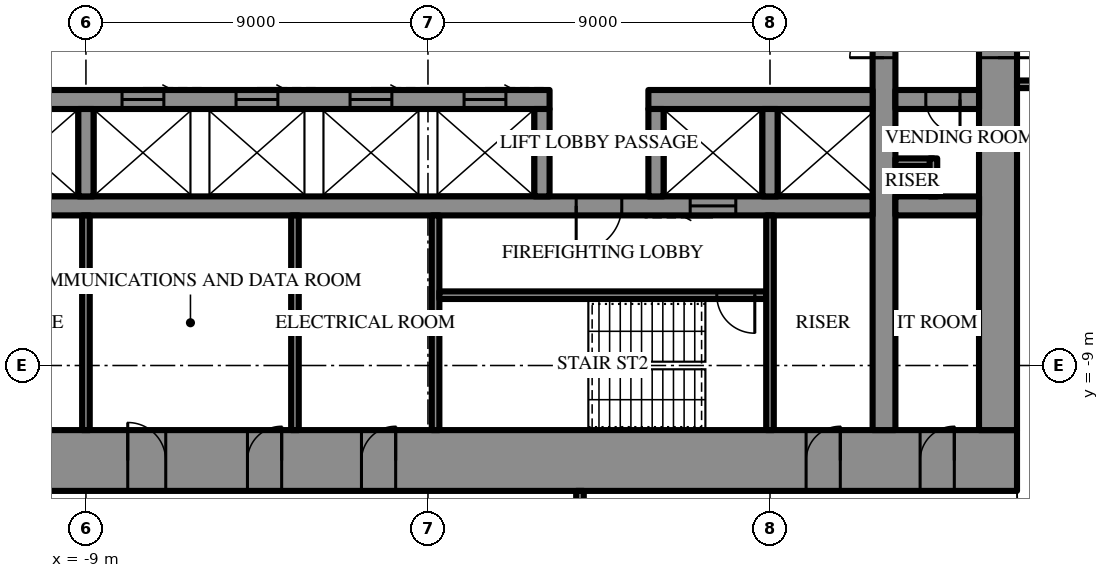
"""IFC4 building model, lengths in metres.
Left out: names, types, materials, properties, quantities, classifications, styles, units other than length and angle.
Written with IfcOpenShell. Run it as: python <this file> out.ifc"""

import sys

from ifc_helpers import new_model, si_unit, direction, frame, frame_2d, origin, place, context, subcontext, project, spatial, rectangle, extrude, element, fill, save


model = new_model("IFC4")
c1 = context("Model", 3, precision=1e-05, world=origin(), true_north=direction((0.0, 1.0)))
c2 = subcontext(c1, "Body", "Model", "MODEL_VIEW")
j1 = project(units=[si_unit("LENGTHUNIT", "METRE"), si_unit("PLANEANGLEUNIT", "RADIAN")], contexts=[c1])
p1 = place(None, origin())
s1 = spatial("IfcSite", under=j1, at=p1, CompositionType="ELEMENT")
p2 = place(p1, origin())
s2 = spatial("IfcBuilding", under=s1, at=p2, CompositionType="ELEMENT")
p3 = place(p2, frame((0.0, 0.0, 228.1)))
s3 = spatial("IfcBuildingStorey", under=s2, at=p3, CompositionType="ELEMENT", Elevation=228.1)
p4 = place(p3, frame((15.5, -11.5, 0.0), z_axis=(0.0, 0.0, 1.0), x_axis=(-1.0, 0.0, 0.0)))
e1 = element("IfcWall", 1, at=p4, inside=s3, PredefinedType="SHEAR", context=c2, shape_type="SweptSolid", body=[
    extrude(rectangle(XDim=31.0, YDim=1.6, at=frame_2d((15.5, 0.0))), origin(), (0.0, 0.0, 1.0), 4.2),
])
p5 = place(p4, frame((16.35, 0.0, 0.0)))
e2 = element("IfcOpeningElement", 2, at=p5, cuts=e1, PredefinedType="OPENING", context=c2, shape_type="SweptSolid", body=[
    extrude(rectangle(XDim=0.9, YDim=2.2, at=frame_2d((0.45, 1.1))), frame((0.0, 0.81, 0.0), z_axis=(0.0, -1.0, 0.0), x_axis=(1.0, 0.0, 0.0)), (0.0, 0.0, 1.0), 1.62),
])
p6 = place(p4, frame((19.35, 0.0, 0.0)))
e3 = element("IfcOpeningElement", 3, at=p6, cuts=e1, PredefinedType="OPENING", context=c2, shape_type="SweptSolid", body=[
    extrude(rectangle(XDim=0.9, YDim=2.2, at=frame_2d((0.45, 1.1))), frame((0.0, 0.81, 0.0), z_axis=(0.0, -1.0, 0.0), x_axis=(1.0, 0.0, 0.0)), (0.0, 0.0, 1.0), 1.62),
])
p7 = place(p4, frame((22.4, 0.0, 0.0)))
e4 = element("IfcOpeningElement", 4, at=p7, cuts=e1, PredefinedType="OPENING", context=c2, shape_type="SweptSolid", body=[
    extrude(rectangle(XDim=1.0, YDim=2.2, at=frame_2d((0.5, 1.1))), frame((0.0, 0.81, 0.0), z_axis=(0.0, -1.0, 0.0), x_axis=(1.0, 0.0, 0.0)), (0.0, 0.0, 1.0), 1.62),
])
p8 = place(p4, frame((1.65, 0.0, 0.0)))
e5 = element("IfcOpeningElement", 5, at=p8, cuts=e1, PredefinedType="OPENING", context=c2, shape_type="SweptSolid", body=[
    extrude(rectangle(XDim=0.9, YDim=2.2, at=frame_2d((0.45, 1.1))), frame((0.0, 0.81, 0.0), z_axis=(0.0, -1.0, 0.0), x_axis=(1.0, 0.0, 0.0)), (0.0, 0.0, 1.0), 1.62),
])
p9 = place(p4, frame((4.65, 0.0, 0.0)))
e6 = element("IfcOpeningElement", 6, at=p9, cuts=e1, PredefinedType="OPENING", context=c2, shape_type="SweptSolid", body=[
    extrude(rectangle(XDim=0.9, YDim=2.2, at=frame_2d((0.45, 1.1))), frame((0.0, 0.81, 0.0), z_axis=(0.0, -1.0, 0.0), x_axis=(1.0, 0.0, 0.0)), (0.0, 0.0, 1.0), 1.62),
])
p10 = place(p4, frame((25.45, 0.0, 0.0)))
e7 = element("IfcOpeningElement", 7, at=p10, cuts=e1, PredefinedType="OPENING", context=c2, shape_type="SweptSolid", body=[
    extrude(rectangle(XDim=0.9, YDim=2.2, at=frame_2d((0.45, 1.1))), frame((0.0, 0.81, 0.0), z_axis=(0.0, -1.0, 0.0), x_axis=(1.0, 0.0, 0.0)), (0.0, 0.0, 1.0), 1.62),
])
p11 = place(p4, frame((28.45, 0.0, 0.0)))
e8 = element("IfcOpeningElement", 8, at=p11, cuts=e1, PredefinedType="OPENING", context=c2, shape_type="SweptSolid", body=[
    extrude(rectangle(XDim=0.9, YDim=2.2, at=frame_2d((0.45, 1.1))), frame((0.0, 0.81, 0.0), z_axis=(0.0, -1.0, 0.0), x_axis=(1.0, 0.0, 0.0)), (0.0, 0.0, 1.0), 1.62),
])
p12 = place(p3, frame((15.0, -10.7, 0.0), z_axis=(0.0, 0.0, 1.0), x_axis=(0.0, 1.0, 0.0)))
e9 = element("IfcWall", 9, at=p12, inside=s3, PredefinedType="SHEAR", context=c2, shape_type="SweptSolid", body=[
    extrude(rectangle(XDim=21.4, YDim=1.0, at=frame_2d((10.7, 0.0))), origin(), (0.0, 0.0, 1.0), 4.2),
])
p13 = place(p12, frame((9.8, 0.0, 0.0)))
e10 = element("IfcOpeningElement", 10, at=p13, cuts=e9, PredefinedType="OPENING", context=c2, shape_type="SweptSolid", body=[
    extrude(rectangle(XDim=1.8, YDim=2.4, at=frame_2d((0.9, 1.2))), frame((0.0, 0.51, 0.0), z_axis=(0.0, -1.0, 0.0), x_axis=(1.0, 0.0, 0.0)), (0.0, 0.0, 1.0), 1.02),
])
p14 = place(p3, frame((12.0, -10.7, 0.0), z_axis=(0.0, 0.0, 1.0), x_axis=(0.0, 1.0, 0.0)))
e11 = element("IfcWall", 11, at=p14, inside=s3, PredefinedType="SHEAR", context=c2, shape_type="SweptSolid", body=[
    extrude(rectangle(XDim=21.4, YDim=0.6, at=frame_2d((10.7, 0.0))), origin(), (0.0, 0.0, 1.0), 4.2),
])
p15 = place(p14, frame((9.8, 0.0, 0.0)))
e12 = element("IfcOpeningElement", 12, at=p15, cuts=e11, PredefinedType="OPENING", context=c2, shape_type="SweptSolid", body=[
    extrude(rectangle(XDim=1.8, YDim=2.4, at=frame_2d((0.9, 1.2))), frame((0.0, 0.31, 0.0), z_axis=(0.0, -1.0, 0.0), x_axis=(1.0, 0.0, 0.0)), (0.0, 0.0, 1.0), 0.62),
])
p16 = place(p3, frame((14.5, -2.0, 0.0), z_axis=(0.0, 0.0, 1.0), x_axis=(-1.0, 0.0, 0.0)))
e13 = element("IfcWall", 13, at=p16, inside=s3, PredefinedType="SHEAR", context=c2, shape_type="SweptSolid", body=[
    extrude(rectangle(XDim=2.2, YDim=0.5, at=frame_2d((1.1, 0.0))), origin(), (0.0, 0.0, 1.0), 4.2),
])
p17 = place(p16, frame((0.5, 0.0, 0.0)))
e14 = element("IfcOpeningElement", 14, at=p17, cuts=e13, PredefinedType="OPENING", context=c2, shape_type="SweptSolid", body=[
    extrude(rectangle(XDim=0.9, YDim=2.2, at=frame_2d((0.45, 1.1))), frame((0.0, 0.26, 0.0), z_axis=(0.0, -1.0, 0.0), x_axis=(1.0, 0.0, 0.0)), (0.0, 0.0, 1.0), 0.52),
])
p18 = place(p3, frame((11.7, -2.0, 0.0), z_axis=(0.0, 0.0, 1.0), x_axis=(-1.0, 0.0, 0.0)))
e15 = element("IfcWall", 15, at=p18, inside=s3, PredefinedType="SHEAR", context=c2, shape_type="SweptSolid", body=[
    extrude(rectangle(XDim=5.9, YDim=0.5, at=frame_2d((2.95, 0.0))), origin(), (0.0, 0.0, 1.0), 4.2),
])
p19 = place(p3, frame((3.2, -2.0, 0.0), z_axis=(0.0, 0.0, 1.0), x_axis=(-1.0, 0.0, 0.0)))
e16 = element("IfcWall", 16, at=p19, inside=s3, PredefinedType="SHEAR", context=c2, shape_type="SweptSolid", body=[
    extrude(rectangle(XDim=14.9, YDim=0.5, at=frame_2d((7.45, 0.0))), origin(), (0.0, 0.0, 1.0), 4.2),
])
p20 = place(p19, frame((1.15, 0.0, 0.0)))
e17 = element("IfcOpeningElement", 17, at=p20, cuts=e16, PredefinedType="OPENING", context=c2, shape_type="SweptSolid", body=[
    extrude(rectangle(XDim=1.1, YDim=2.2, at=frame_2d((0.55, 1.1))), frame((0.0, 0.26, 0.0), z_axis=(0.0, -1.0, 0.0), x_axis=(1.0, 0.0, 0.0)), (0.0, 0.0, 1.0), 0.52),
])
p21 = place(p19, frame((4.15, 0.0, 0.0)))
e18 = element("IfcOpeningElement", 18, at=p21, cuts=e16, PredefinedType="OPENING", context=c2, shape_type="SweptSolid", body=[
    extrude(rectangle(XDim=1.1, YDim=2.2, at=frame_2d((0.55, 1.1))), frame((0.0, 0.26, 0.0), z_axis=(0.0, -1.0, 0.0), x_axis=(1.0, 0.0, 0.0)), (0.0, 0.0, 1.0), 0.52),
])
p22 = place(p19, frame((7.15, 0.0, 0.0)))
e19 = element("IfcOpeningElement", 19, at=p22, cuts=e16, PredefinedType="OPENING", context=c2, shape_type="SweptSolid", body=[
    extrude(rectangle(XDim=1.1, YDim=2.2, at=frame_2d((0.55, 1.1))), frame((0.0, 0.26, 0.0), z_axis=(0.0, -1.0, 0.0), x_axis=(1.0, 0.0, 0.0)), (0.0, 0.0, 1.0), 0.52),
])
p23 = place(p19, frame((10.15, 0.0, 0.0)))
e20 = element("IfcOpeningElement", 20, at=p23, cuts=e16, PredefinedType="OPENING", context=c2, shape_type="SweptSolid", body=[
    extrude(rectangle(XDim=1.1, YDim=2.2, at=frame_2d((0.55, 1.1))), frame((0.0, 0.26, 0.0), z_axis=(0.0, -1.0, 0.0), x_axis=(1.0, 0.0, 0.0)), (0.0, 0.0, 1.0), 0.52),
])
p24 = place(p3, frame((14.5, -4.8, 0.0), z_axis=(0.0, 0.0, 1.0), x_axis=(-1.0, 0.0, 0.0)))
e21 = element("IfcWall", 21, at=p24, inside=s3, PredefinedType="SHEAR", context=c2, shape_type="SweptSolid", body=[
    extrude(rectangle(XDim=2.2, YDim=0.5, at=frame_2d((1.1, 0.0))), origin(), (0.0, 0.0, 1.0), 4.2),
])
p25 = place(p3, frame((11.7, -4.8, 0.0), z_axis=(0.0, 0.0, 1.0), x_axis=(-1.0, 0.0, 0.0)))
e22 = element("IfcWall", 22, at=p25, inside=s3, PredefinedType="SHEAR", context=c2, shape_type="SweptSolid", body=[
    extrude(rectangle(XDim=23.4, YDim=0.5, at=frame_2d((11.7, 0.0))), origin(), (0.0, 0.0, 1.0), 4.2),
])
p26 = place(p25, frame((6.6, 0.0, 0.0)))
e23 = element("IfcOpeningElement", 23, at=p26, cuts=e22, PredefinedType="OPENING", context=c2, shape_type="SweptSolid", body=[
    extrude(rectangle(XDim=1.2, YDim=2.2, at=frame_2d((0.6, 1.1))), frame((0.0, 0.26, 0.0), z_axis=(0.0, -1.0, 0.0), x_axis=(1.0, 0.0, 0.0)), (0.0, 0.0, 1.0), 0.52),
])
p27 = place(p25, frame((3.6, 0.0, 0.0)))
e24 = element("IfcOpeningElement", 24, at=p27, cuts=e22, PredefinedType="OPENING", context=c2, shape_type="SweptSolid", body=[
    extrude(rectangle(XDim=1.2, YDim=2.2, at=frame_2d((0.6, 1.1))), frame((0.0, 0.26, 0.0), z_axis=(0.0, -1.0, 0.0), x_axis=(1.0, 0.0, 0.0)), (0.0, 0.0, 1.0), 0.52),
])
for number, where, z_axis, x_axis in (
    (25, (9.0, -2.25, 0.0), (0.0, 0.0, 1.0), (0.0, -1.0, 0.0)),
    (26, (6.0, -2.25, 0.0), (0.0, 0.0, 1.0), (0.0, -1.0, 0.0)),
    (27, (3.0, -2.25, 0.0), (0.0, 0.0, 1.0), (0.0, -1.0, 0.0)),
    (28, (-9.0, -2.25, 0.0), (0.0, 0.0, 1.0), (0.0, -1.0, 0.0)),
):
    element("IfcWall", number, at=place(p3, frame(where, z_axis=z_axis, x_axis=x_axis)), inside=s3, PredefinedType="SHEAR", context=c2, shape_type="SweptSolid", body=[
        extrude(rectangle(XDim=2.3, YDim=0.4, at=frame_2d((1.15, 0.0))), origin(), (0.0, 0.0, 1.0), 4.2),
    ])
p28 = place(p3, frame((0.2, -5.05, 0.0), z_axis=(0.0, 0.0, 1.0), x_axis=(0.0, -1.0, 0.0)))
e29 = element("IfcWall", 29, at=p28, inside=s3, PredefinedType="SHEAR", context=c2, shape_type="SweptSolid", body=[
    extrude(rectangle(XDim=5.65, YDim=0.2, at=frame_2d((2.825, 0.0))), origin(), (0.0, 0.0, 1.0), 4.2),
])
p29 = place(p3, frame((8.9, -7.15, 0.0), z_axis=(0.0, 0.0, 1.0), x_axis=(-1.0, 0.0, 0.0)))
e30 = element("IfcWall", 30, at=p29, inside=s3, PredefinedType="SHEAR", context=c2, shape_type="SweptSolid", body=[
    extrude(rectangle(XDim=8.6, YDim=0.2, at=frame_2d((4.3, 0.0))), origin(), (0.0, 0.0, 1.0), 4.2),
])
p30 = place(p29, frame((0.3, 0.0, 0.0)))
e31 = element("IfcOpeningElement", 31, at=p30, cuts=e30, PredefinedType="OPENING", context=c2, shape_type="SweptSolid", body=[
    extrude(rectangle(XDim=1.0, YDim=2.2, at=frame_2d((0.5, 1.1))), frame((0.0, 0.11, 0.0), z_axis=(0.0, -1.0, 0.0), x_axis=(1.0, 0.0, 0.0)), (0.0, 0.0, 1.0), 0.22),
])
for number, where, z_axis, x_axis in (
    (32, (9.0, -5.05, 0.0), (0.0, 0.0, 1.0), (0.0, -1.0, 0.0)),
    (33, (-9.0, -5.05, 0.0), (0.0, 0.0, 1.0), (0.0, -1.0, 0.0)),
    (34, (-3.5, -5.05, 0.0), (0.0, 0.0, 1.0), (0.0, -1.0, 0.0)),
):
    element("IfcWall", number, at=place(p3, frame(where, z_axis=z_axis, x_axis=x_axis)), inside=s3, PredefinedType="PARTITIONING", context=c2, shape_type="SweptSolid", body=[
        extrude(rectangle(XDim=5.65, YDim=0.2, at=frame_2d((2.825, 0.0))), origin(), (0.0, 0.0, 1.0), 4.0),
    ])
for number, where, z_axis, x_axis in (
    (35, (13.3, -3.65, 0.0), (0.0, 0.0, 1.0), (-1.0, 0.0, 0.0)),
    (36, (13.3, -3.55, 0.0), (0.0, 0.0, 1.0), (0.0, -1.0, 0.0)),
):
    element("IfcWall", number, at=place(p3, frame(where, z_axis=z_axis, x_axis=x_axis)), inside=s3, PredefinedType="PARTITIONING", context=c2, shape_type="SweptSolid", body=[
        extrude(rectangle(XDim=1.0, YDim=0.2, at=frame_2d((0.5, 0.0))), origin(), (0.0, 0.0, 1.0), 4.0),
    ])
p31 = place(p3, frame((15.5, -1.6, 0.0), z_axis=(0.0, 0.0, 1.0), x_axis=(1.0, 0.0, 0.0)))
e37 = element("IfcWall", 37, at=p31, inside=s3, PredefinedType="PARTITIONING", context=c2, shape_type="SweptSolid", body=[
    extrude(rectangle(XDim=2.3, YDim=0.2, at=frame_2d((1.15, 0.0))), origin(), (0.0, 0.0, 1.0), 4.0),
])
p32 = place(p3, frame((4.0, -12.3, 0.0), z_axis=(0.0, 0.0, 1.0), x_axis=(0.0, -1.0, 0.0)))
e38 = element("IfcWall", 38, at=p32, inside=s3, PredefinedType="PARTITIONING", context=c2, shape_type="SweptSolid", body=[
    extrude(rectangle(XDim=15.35, YDim=0.2, at=frame_2d((7.675, 0.0))), origin(), (0.0, 0.0, 1.0), 4.0),
])
p33 = place(p13, frame((1.8, 0.0, 0.0), z_axis=(0.0, 0.0, 1.0), x_axis=(-1.0, 0.0, 0.0)))
e39 = element("IfcDoor", 39, at=p33, inside=s3, OperationType="DOUBLE_DOOR_SINGLE_SWING", PredefinedType="DOOR", context=c2, shape_type="SweptSolid", body=[
    extrude(rectangle(XDim=1.8, YDim=2.4, at=frame_2d((0.9, 1.2))), frame((0.0, 0.025, 0.0), z_axis=(0.0, -1.0, 0.0), x_axis=(1.0, 0.0, 0.0)), (0.0, 0.0, 1.0), 0.05),
])
fill(e10, e39)
p34 = place(p26, origin())
e40 = element("IfcDoor", 40, at=p34, inside=s3, OperationType="SINGLE_SWING_LEFT", PredefinedType="DOOR", context=c2, shape_type="SweptSolid", body=[
    extrude(rectangle(XDim=1.2, YDim=2.2, at=frame_2d((0.6, 1.1))), frame((0.0, 0.025, 0.0), z_axis=(0.0, -1.0, 0.0), x_axis=(1.0, 0.0, 0.0)), (0.0, 0.0, 1.0), 0.05),
])
fill(e23, e40)
p35 = place(p30, origin())
e41 = element("IfcDoor", 41, at=p35, inside=s3, OperationType="SINGLE_SWING_RIGHT", PredefinedType="DOOR", context=c2, shape_type="SweptSolid", body=[
    extrude(rectangle(XDim=1.0, YDim=2.2, at=frame_2d((0.5, 1.1))), frame((0.0, 0.025, 0.0), z_axis=(0.0, -1.0, 0.0), x_axis=(1.0, 0.0, 0.0)), (0.0, 0.0, 1.0), 0.05),
])
fill(e31, e41)
p36 = place(p5, frame((0.9, 0.0, 0.0), z_axis=(0.0, 0.0, 1.0), x_axis=(-1.0, 0.0, 0.0)))
e42 = element("IfcDoor", 42, at=p36, inside=s3, OperationType="SINGLE_SWING_LEFT", PredefinedType="DOOR", context=c2, shape_type="SweptSolid", body=[
    extrude(rectangle(XDim=0.9, YDim=2.2, at=frame_2d((0.45, 1.1))), frame((0.0, 0.025, 0.0), z_axis=(0.0, -1.0, 0.0), x_axis=(1.0, 0.0, 0.0)), (0.0, 0.0, 1.0), 0.05),
])
fill(e2, e42)
p37 = place(p6, frame((0.9, 0.0, 0.0), z_axis=(0.0, 0.0, 1.0), x_axis=(-1.0, 0.0, 0.0)))
e43 = element("IfcDoor", 43, at=p37, inside=s3, OperationType="SINGLE_SWING_LEFT", PredefinedType="DOOR", context=c2, shape_type="SweptSolid", body=[
    extrude(rectangle(XDim=0.9, YDim=2.2, at=frame_2d((0.45, 1.1))), frame((0.0, 0.025, 0.0), z_axis=(0.0, -1.0, 0.0), x_axis=(1.0, 0.0, 0.0)), (0.0, 0.0, 1.0), 0.05),
])
fill(e3, e43)
p38 = place(p7, frame((1.0, 0.0, 0.0), z_axis=(0.0, 0.0, 1.0), x_axis=(-1.0, 0.0, 0.0)))
e44 = element("IfcDoor", 44, at=p38, inside=s3, OperationType="SINGLE_SWING_RIGHT", PredefinedType="DOOR", context=c2, shape_type="SweptSolid", body=[
    extrude(rectangle(XDim=1.0, YDim=2.2, at=frame_2d((0.5, 1.1))), frame((0.0, 0.025, 0.0), z_axis=(0.0, -1.0, 0.0), x_axis=(1.0, 0.0, 0.0)), (0.0, 0.0, 1.0), 0.05),
])
fill(e4, e44)
p39 = place(p8, frame((0.9, 0.0, 0.0), z_axis=(0.0, 0.0, 1.0), x_axis=(-1.0, 0.0, 0.0)))
e45 = element("IfcDoor", 45, at=p39, inside=s3, OperationType="SINGLE_SWING_LEFT", PredefinedType="DOOR", context=c2, shape_type="SweptSolid", body=[
    extrude(rectangle(XDim=0.9, YDim=2.2, at=frame_2d((0.45, 1.1))), frame((0.0, 0.025, 0.0), z_axis=(0.0, -1.0, 0.0), x_axis=(1.0, 0.0, 0.0)), (0.0, 0.0, 1.0), 0.05),
])
fill(e5, e45)
p40 = place(p9, frame((0.9, 0.0, 0.0), z_axis=(0.0, 0.0, 1.0), x_axis=(-1.0, 0.0, 0.0)))
e46 = element("IfcDoor", 46, at=p40, inside=s3, OperationType="SINGLE_SWING_LEFT", PredefinedType="DOOR", context=c2, shape_type="SweptSolid", body=[
    extrude(rectangle(XDim=0.9, YDim=2.2, at=frame_2d((0.45, 1.1))), frame((0.0, 0.025, 0.0), z_axis=(0.0, -1.0, 0.0), x_axis=(1.0, 0.0, 0.0)), (0.0, 0.0, 1.0), 0.05),
])
fill(e6, e46)
p41 = place(p17, origin())
e47 = element("IfcDoor", 47, at=p41, inside=s3, OperationType="SINGLE_SWING_RIGHT", PredefinedType="DOOR", context=c2, shape_type="SweptSolid", body=[
    extrude(rectangle(XDim=0.9, YDim=2.2, at=frame_2d((0.45, 1.1))), frame((0.0, 0.025, 0.0), z_axis=(0.0, -1.0, 0.0), x_axis=(1.0, 0.0, 0.0)), (0.0, 0.0, 1.0), 0.05),
])
fill(e14, e47)
p42 = place(p15, origin())
e48 = element("IfcDoor", 48, at=p42, inside=s3, OperationType="DOUBLE_DOOR_SINGLE_SWING", PredefinedType="DOOR", context=c2, shape_type="SweptSolid", body=[
    extrude(rectangle(XDim=1.8, YDim=2.4, at=frame_2d((0.9, 1.2))), frame((0.0, 0.025, 0.0), z_axis=(0.0, -1.0, 0.0), x_axis=(1.0, 0.0, 0.0)), (0.0, 0.0, 1.0), 0.05),
])
fill(e12, e48)
p43 = place(p27, origin())
e49 = element("IfcDoor", 49, at=p43, inside=s3, OperationType="SLIDING_TO_LEFT", PredefinedType="DOOR", context=c2, shape_type="SweptSolid", body=[
    extrude(rectangle(XDim=1.2, YDim=2.2, at=frame_2d((0.6, 1.1))), frame((0.0, 0.025, 0.0), z_axis=(0.0, -1.0, 0.0), x_axis=(1.0, 0.0, 0.0)), (0.0, 0.0, 1.0), 0.05),
])
fill(e24, e49)
p44 = place(p20, frame((1.1, 0.0, 0.0), z_axis=(0.0, 0.0, 1.0), x_axis=(-1.0, 0.0, 0.0)))
e50 = element("IfcDoor", 50, at=p44, inside=s3, OperationType="SLIDING_TO_LEFT", PredefinedType="DOOR", context=c2, shape_type="SweptSolid", body=[
    extrude(rectangle(XDim=1.1, YDim=2.2, at=frame_2d((0.55, 1.1))), frame((0.0, 0.025, 0.0), z_axis=(0.0, -1.0, 0.0), x_axis=(1.0, 0.0, 0.0)), (0.0, 0.0, 1.0), 0.05),
])
fill(e17, e50)
p45 = place(p21, frame((1.1, 0.0, 0.0), z_axis=(0.0, 0.0, 1.0), x_axis=(-1.0, 0.0, 0.0)))
e51 = element("IfcDoor", 51, at=p45, inside=s3, OperationType="SLIDING_TO_LEFT", PredefinedType="DOOR", context=c2, shape_type="SweptSolid", body=[
    extrude(rectangle(XDim=1.1, YDim=2.2, at=frame_2d((0.55, 1.1))), frame((0.0, 0.025, 0.0), z_axis=(0.0, -1.0, 0.0), x_axis=(1.0, 0.0, 0.0)), (0.0, 0.0, 1.0), 0.05),
])
fill(e18, e51)
p46 = place(p22, frame((1.1, 0.0, 0.0), z_axis=(0.0, 0.0, 1.0), x_axis=(-1.0, 0.0, 0.0)))
e52 = element("IfcDoor", 52, at=p46, inside=s3, OperationType="SLIDING_TO_LEFT", PredefinedType="DOOR", context=c2, shape_type="SweptSolid", body=[
    extrude(rectangle(XDim=1.1, YDim=2.2, at=frame_2d((0.55, 1.1))), frame((0.0, 0.025, 0.0), z_axis=(0.0, -1.0, 0.0), x_axis=(1.0, 0.0, 0.0)), (0.0, 0.0, 1.0), 0.05),
])
fill(e19, e52)
p47 = place(p23, frame((1.1, 0.0, 0.0), z_axis=(0.0, 0.0, 1.0), x_axis=(-1.0, 0.0, 0.0)))
e53 = element("IfcDoor", 53, at=p47, inside=s3, OperationType="SLIDING_TO_LEFT", PredefinedType="DOOR", context=c2, shape_type="SweptSolid", body=[
    extrude(rectangle(XDim=1.1, YDim=2.2, at=frame_2d((0.55, 1.1))), frame((0.0, 0.025, 0.0), z_axis=(0.0, -1.0, 0.0), x_axis=(1.0, 0.0, 0.0)), (0.0, 0.0, 1.0), 0.05),
])
fill(e20, e53)
save(model, sys.argv[1])
